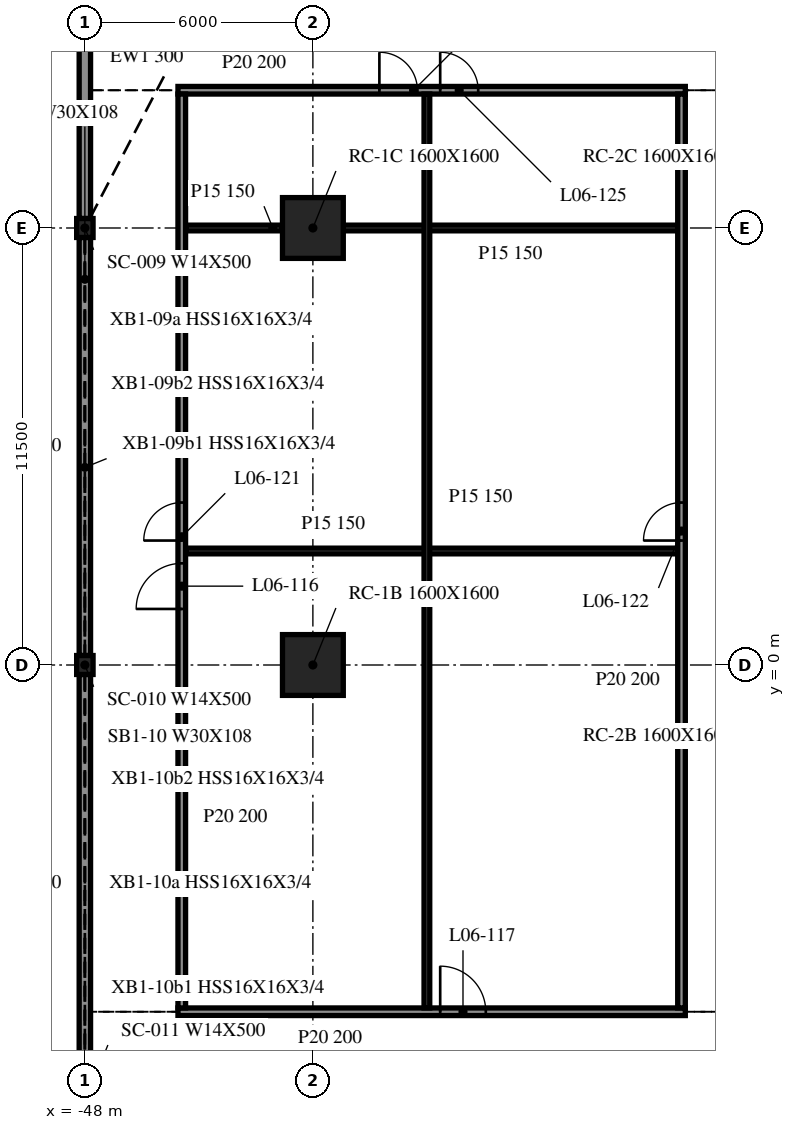
"""IFC4 building model, lengths in metres.
Left out: names, types, materials, properties, quantities, classifications, styles, units other than length and angle.
Written with IfcOpenShell. Run it as: python <this file> out.ifc"""

import sys

from ifc_helpers import new_model, si_unit, direction, frame, frame_2d, origin, origin_2d, place, context, subcontext, project, spatial, rectangle, i_section, extrude, element, fill, save


model = new_model("IFC4")
c1 = context("Model", 3, precision=1e-05, world=origin(), true_north=direction((0.0, 1.0)))
c2 = subcontext(c1, "Body", "Model", "MODEL_VIEW")
j1 = project(units=[si_unit("LENGTHUNIT", "METRE"), si_unit("PLANEANGLEUNIT", "RADIAN")], contexts=[c1])
p1 = place(None, origin())
s1 = spatial("IfcSite", under=j1, at=p1, CompositionType="ELEMENT")
p2 = place(p1, origin())
s2 = spatial("IfcBuilding", under=s1, at=p2, CompositionType="ELEMENT")
p3 = place(p2, frame((0.0, 0.0, 28.7)))
s3 = spatial("IfcBuildingStorey", under=s2, at=p3, CompositionType="ELEMENT", Elevation=28.7)
for number, where, z_axis, x_axis in (
    (1, (-42.0, 0.0, -0.34), (0.0, 0.0, 1.0), (1.0, 0.0, 0.0)),
    (2, (-42.0, 11.5, -0.34), (0.0, 0.0, 1.0), (1.0, 0.0, 0.0)),
):
    element("IfcColumn", number, at=place(p3, frame(where, z_axis=z_axis, x_axis=x_axis)), inside=s3, PredefinedType="COLUMN", context=c2, shape_type="SweptSolid", body=[
        extrude(rectangle(XDim=1.6, YDim=1.6, at=origin_2d()), origin(), (0.0, 0.0, 1.0), 4.3),
    ])
for number, where, z_axis, x_axis in (
    (3, (-48.0, 11.5, -0.34), (0.0, 0.0, 1.0), (1.0, 0.0, 0.0)),
    (4, (-48.0, 0.0, -0.34), (0.0, 0.0, 1.0), (1.0, 0.0, 0.0)),
):
    element("IfcColumn", number, at=place(p3, frame(where, z_axis=z_axis, x_axis=x_axis)), inside=s3, PredefinedType="COLUMN", context=c2, shape_type="SweptSolid", body=[
        extrude(i_section(OverallWidth=0.432, OverallDepth=0.498, WebThickness=0.056, FlangeThickness=0.089, at=origin_2d()), origin(), (0.0, 0.0, 1.0), 4.3),
    ])
p4 = place(p3, frame((-48.0, 17.0, 0.0), z_axis=(0.0, 0.0, 1.0), x_axis=(0.0, -1.0, 0.0)))
e5 = element("IfcWall", 5, at=p4, inside=s3, PredefinedType="NOTDEFINED", context=c2, shape_type="SweptSolid", body=[
    extrude(rectangle(XDim=5.251, YDim=0.3, at=frame_2d((2.625, 0.0))), origin(), (0.0, 0.0, 1.0), 3.203),
])
for number, where, z_axis, x_axis in (
    (6, (-48.0, 11.251, 0.0), (0.0, 0.0, 1.0), (0.0, -1.0, 0.0)),
    (7, (-48.0, -0.249, 0.0), (0.0, 0.0, 1.0), (0.0, -1.0, 0.0)),
):
    element("IfcWall", number, at=place(p3, frame(where, z_axis=z_axis, x_axis=x_axis)), inside=s3, PredefinedType="NOTDEFINED", context=c2, shape_type="SweptSolid", body=[
        extrude(rectangle(XDim=11.002, YDim=0.3, at=frame_2d((5.501, 0.0))), origin(), (0.0, 0.0, 1.0), 3.203),
    ])
p5 = place(p3, frame((-45.55, -9.125, 0.0), z_axis=(0.0, 0.0, 1.0), x_axis=(1.0, 0.0, 0.0)))
e8 = element("IfcWall", 8, at=p5, inside=s3, PredefinedType="PARTITIONING", context=c2, shape_type="SweptSolid", body=[
    extrude(rectangle(XDim=13.35, YDim=0.2, at=frame_2d((6.675, 0.0))), origin(), (0.0, 0.0, 1.0), 3.96),
])
p6 = place(p5, frame((6.9, 0.0, 0.0)))
e9 = element("IfcOpeningElement", 9, at=p6, cuts=e8, PredefinedType="OPENING", context=c2, shape_type="SweptSolid", body=[
    extrude(rectangle(XDim=1.2, YDim=2.1, at=frame_2d((0.6, 1.05))), frame((0.0, 0.11, 0.0), z_axis=(0.0, -1.0, 0.0), x_axis=(1.0, 0.0, 0.0)), (0.0, 0.0, 1.0), 0.22),
])
p7 = place(p3, frame((-45.35, 3.0, 0.0), z_axis=(0.0, 0.0, 1.0), x_axis=(1.0, 0.0, 0.0)))
e10 = element("IfcWall", 10, at=p7, inside=s3, PredefinedType="PARTITIONING", context=c2, shape_type="SweptSolid", body=[
    extrude(rectangle(XDim=12.95, YDim=0.15, at=frame_2d((6.475, 0.0))), origin(), (0.0, 0.0, 1.0), 3.96),
])
p8 = place(p3, frame((-45.35, 11.5, 0.0), z_axis=(0.0, 0.0, 1.0), x_axis=(1.0, 0.0, 0.0)))
e11 = element("IfcWall", 11, at=p8, inside=s3, PredefinedType="PARTITIONING", context=c2, shape_type="SweptSolid", body=[
    extrude(rectangle(XDim=2.55, YDim=0.15, at=frame_2d((1.275, 0.0))), origin(), (0.0, 0.0, 1.0), 3.96),
])
p9 = place(p3, frame((-41.2, 11.5, 0.0), z_axis=(0.0, 0.0, 1.0), x_axis=(1.0, 0.0, 0.0)))
e12 = element("IfcWall", 12, at=p9, inside=s3, PredefinedType="PARTITIONING", context=c2, shape_type="SweptSolid", body=[
    extrude(rectangle(XDim=8.8, YDim=0.15, at=frame_2d((4.4, 0.0))), origin(), (0.0, 0.0, 1.0), 3.96),
])
p10 = place(p3, frame((-45.55, 15.125, 0.0), z_axis=(0.0, 0.0, 1.0), x_axis=(1.0, 0.0, 0.0)))
e13 = element("IfcWall", 13, at=p10, inside=s3, PredefinedType="PARTITIONING", context=c2, shape_type="SweptSolid", body=[
    extrude(rectangle(XDim=13.35, YDim=0.2, at=frame_2d((6.675, 0.0))), origin(), (0.0, 0.0, 1.0), 3.96),
])
p11 = place(p10, frame((5.3, 0.0, 0.0)))
e14 = element("IfcOpeningElement", 14, at=p11, cuts=e13, PredefinedType="OPENING", context=c2, shape_type="SweptSolid", body=[
    extrude(rectangle(XDim=1.0, YDim=2.1, at=frame_2d((0.5, 1.05))), frame((0.0, 0.11, 0.0), z_axis=(0.0, -1.0, 0.0), x_axis=(1.0, 0.0, 0.0)), (0.0, 0.0, 1.0), 0.22),
])
p12 = place(p10, frame((6.9, 0.0, 0.0)))
e15 = element("IfcOpeningElement", 15, at=p12, cuts=e13, PredefinedType="OPENING", context=c2, shape_type="SweptSolid", body=[
    extrude(rectangle(XDim=1.0, YDim=2.1, at=frame_2d((0.5, 1.05))), frame((0.0, 0.11, 0.0), z_axis=(0.0, -1.0, 0.0), x_axis=(1.0, 0.0, 0.0)), (0.0, 0.0, 1.0), 0.22),
])
p13 = place(p3, frame((-45.45, -9.025, 0.0), z_axis=(0.0, 0.0, 1.0), x_axis=(0.0, 1.0, 0.0)))
e16 = element("IfcWall", 16, at=p13, inside=s3, PredefinedType="PARTITIONING", context=c2, shape_type="SweptSolid", body=[
    extrude(rectangle(XDim=24.05, YDim=0.2, at=frame_2d((12.025, 0.0))), origin(), (0.0, 0.0, 1.0), 3.96),
])
p14 = place(p13, frame((10.5, 0.0, 0.0)))
e17 = element("IfcOpeningElement", 17, at=p14, cuts=e16, PredefinedType="OPENING", context=c2, shape_type="SweptSolid", body=[
    extrude(rectangle(XDim=1.2, YDim=2.1, at=frame_2d((0.6, 1.05))), frame((0.0, 0.11, 0.0), z_axis=(0.0, -1.0, 0.0), x_axis=(1.0, 0.0, 0.0)), (0.0, 0.0, 1.0), 0.22),
])
p15 = place(p13, frame((12.3, 0.0, 0.0)))
e18 = element("IfcOpeningElement", 18, at=p15, cuts=e16, PredefinedType="OPENING", context=c2, shape_type="SweptSolid", body=[
    extrude(rectangle(XDim=1.0, YDim=2.1, at=frame_2d((0.5, 1.05))), frame((0.0, 0.11, 0.0), z_axis=(0.0, -1.0, 0.0), x_axis=(1.0, 0.0, 0.0)), (0.0, 0.0, 1.0), 0.22),
])
p16 = place(p3, frame((-39.0, -9.025, 0.0), z_axis=(0.0, 0.0, 1.0), x_axis=(0.0, 1.0, 0.0)))
e19 = element("IfcWall", 19, at=p16, inside=s3, PredefinedType="PARTITIONING", context=c2, shape_type="SweptSolid", body=[
    extrude(rectangle(XDim=24.05, YDim=0.15, at=frame_2d((12.025, 0.0))), origin(), (0.0, 0.0, 1.0), 3.96),
])
p17 = place(p3, frame((-32.3, -9.025, 0.0), z_axis=(0.0, 0.0, 1.0), x_axis=(0.0, 1.0, 0.0)))
e20 = element("IfcWall", 20, at=p17, inside=s3, PredefinedType="PARTITIONING", context=c2, shape_type="SweptSolid", body=[
    extrude(rectangle(XDim=24.05, YDim=0.2, at=frame_2d((12.025, 0.0))), origin(), (0.0, 0.0, 1.0), 3.96),
])
p18 = place(p17, frame((12.3, 0.0, 0.0)))
e21 = element("IfcOpeningElement", 21, at=p18, cuts=e20, PredefinedType="OPENING", context=c2, shape_type="SweptSolid", body=[
    extrude(rectangle(XDim=1.0, YDim=2.1, at=frame_2d((0.5, 1.05))), frame((0.0, 0.11, 0.0), z_axis=(0.0, -1.0, 0.0), x_axis=(1.0, 0.0, 0.0)), (0.0, 0.0, 1.0), 0.22),
])
p19 = place(p14, origin())
e22 = element("IfcDoor", 22, at=p19, inside=s3, OperationType="SINGLE_SWING_RIGHT", PredefinedType="DOOR", context=c2, shape_type="SweptSolid", body=[
    extrude(rectangle(XDim=1.2, YDim=2.1, at=frame_2d((0.6, 1.05))), frame((0.0, 0.025, 0.0), z_axis=(0.0, -1.0, 0.0), x_axis=(1.0, 0.0, 0.0)), (0.0, 0.0, 1.0), 0.05),
])
fill(e17, e22)
p20 = place(p6, origin())
e23 = element("IfcDoor", 23, at=p20, inside=s3, OperationType="SINGLE_SWING_RIGHT", PredefinedType="DOOR", context=c2, shape_type="SweptSolid", body=[
    extrude(rectangle(XDim=1.2, YDim=2.1, at=frame_2d((0.6, 1.05))), frame((0.0, 0.025, 0.0), z_axis=(0.0, -1.0, 0.0), x_axis=(1.0, 0.0, 0.0)), (0.0, 0.0, 1.0), 0.05),
])
fill(e9, e23)
p21 = place(p15, origin())
e24 = element("IfcDoor", 24, at=p21, inside=s3, OperationType="SINGLE_SWING_LEFT", PredefinedType="DOOR", context=c2, shape_type="SweptSolid", body=[
    extrude(rectangle(XDim=1.0, YDim=2.1, at=frame_2d((0.5, 1.05))), frame((0.0, 0.025, 0.0), z_axis=(0.0, -1.0, 0.0), x_axis=(1.0, 0.0, 0.0)), (0.0, 0.0, 1.0), 0.05),
])
fill(e18, e24)
p22 = place(p18, origin())
e25 = element("IfcDoor", 25, at=p22, inside=s3, OperationType="SINGLE_SWING_RIGHT", PredefinedType="DOOR", context=c2, shape_type="SweptSolid", body=[
    extrude(rectangle(XDim=1.0, YDim=2.1, at=frame_2d((0.5, 1.05))), frame((0.0, 0.025, 0.0), z_axis=(0.0, -1.0, 0.0), x_axis=(1.0, 0.0, 0.0)), (0.0, 0.0, 1.0), 0.05),
])
fill(e21, e25)
p23 = place(p11, origin())
e26 = element("IfcDoor", 26, at=p23, inside=s3, OperationType="SINGLE_SWING_RIGHT", PredefinedType="DOOR", context=c2, shape_type="SweptSolid", body=[
    extrude(rectangle(XDim=1.0, YDim=2.1, at=frame_2d((0.5, 1.05))), frame((0.0, 0.025, 0.0), z_axis=(0.0, -1.0, 0.0), x_axis=(1.0, 0.0, 0.0)), (0.0, 0.0, 1.0), 0.05),
])
fill(e14, e26)
p24 = place(p12, origin())
e27 = element("IfcDoor", 27, at=p24, inside=s3, OperationType="SINGLE_SWING_LEFT", PredefinedType="DOOR", context=c2, shape_type="SweptSolid", body=[
    extrude(rectangle(XDim=1.0, YDim=2.1, at=frame_2d((0.5, 1.05))), frame((0.0, 0.025, 0.0), z_axis=(0.0, -1.0, 0.0), x_axis=(1.0, 0.0, 0.0)), (0.0, 0.0, 1.0), 0.05),
])
fill(e15, e27)
save(model, sys.argv[1])
